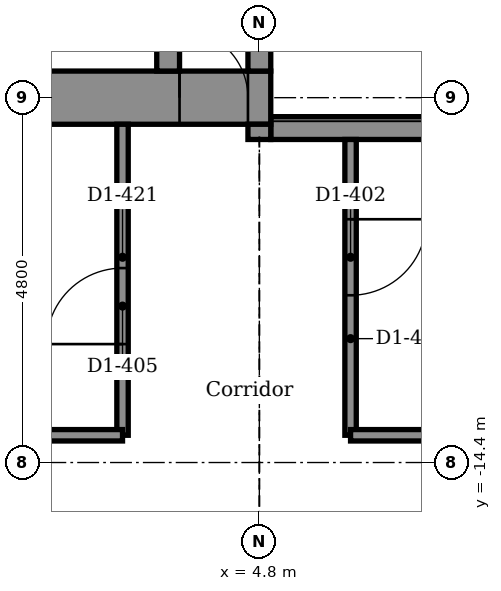
"""IFC4 building model, lengths in metres.
Left out: names, types, materials, properties, quantities, classifications, styles, units other than length and angle.
Written with IfcOpenShell. Run it as: python <this file> out.ifc"""

import sys

from ifc_helpers import new_model, si_unit, direction, frame, frame_2d, origin, place, context, subcontext, project, spatial, rectangle, extrude, element, fill, save


model = new_model("IFC4")
c1 = context("Model", 3, precision=1e-05, world=origin(), true_north=direction((0.0, 1.0)))
c2 = subcontext(c1, "Body", "Model", "MODEL_VIEW")
j1 = project(units=[si_unit("LENGTHUNIT", "METRE"), si_unit("PLANEANGLEUNIT", "RADIAN")], contexts=[c1])
p1 = place(None, origin())
s1 = spatial("IfcSite", under=j1, at=p1, CompositionType="ELEMENT")
p2 = place(p1, origin())
s2 = spatial("IfcBuilding", under=s1, at=p2, CompositionType="ELEMENT")
p3 = place(p2, frame((0.0, 0.0, 138.8)))
s3 = spatial("IfcBuildingStorey", under=s2, at=p3, CompositionType="ELEMENT", Elevation=138.8)
p4 = place(p3, frame((4.95, -10.0, -0.15), z_axis=(0.0, 0.0, 1.0), x_axis=(1.0, 0.0, 0.0)))
e1 = element("IfcWall", 1, at=p4, inside=s3, PredefinedType="STANDARD", context=c2, shape_type="SweptSolid", body=[
    extrude(rectangle(XDim=4.3, YDim=0.3, at=frame_2d((2.15, 0.0))), origin(), (0.0, 0.0, 1.0), 3.9),
])
p5 = place(p3, frame((-5.25, -9.6, -0.15), z_axis=(0.0, 0.0, 1.0), x_axis=(1.0, 0.0, 0.0)))
e2 = element("IfcWall", 2, at=p5, inside=s3, PredefinedType="SHEAR", context=c2, shape_type="SweptSolid", body=[
    extrude(rectangle(XDim=10.2, YDim=0.7, at=frame_2d((5.1, 0.0))), origin(), (0.0, 0.0, 1.0), 3.9),
])
p6 = place(p5, frame((9.0, 0.0, 0.15)))
e3 = element("IfcOpeningElement", 3, at=p6, cuts=e2, PredefinedType="OPENING", context=c2, shape_type="SweptSolid", body=[
    extrude(rectangle(XDim=0.9, YDim=2.1, at=frame_2d((0.45, 1.05))), frame((0.0, 0.36, 0.0), z_axis=(0.0, -1.0, 0.0), x_axis=(1.0, 0.0, 0.0)), (0.0, 0.0, 1.0), 0.72),
])
p7 = place(p3, frame((3.6, -9.25, -0.15), z_axis=(0.0, 0.0, 1.0), x_axis=(0.0, 1.0, 0.0)))
e4 = element("IfcWall", 4, at=p7, inside=s3, PredefinedType="STANDARD", context=c2, shape_type="SweptSolid", body=[
    extrude(rectangle(XDim=3.4, YDim=0.3, at=frame_2d((1.7, 0.0))), origin(), (0.0, 0.0, 1.0), 3.9),
])
p8 = place(p3, frame((4.8, -10.15, -0.15), z_axis=(0.0, 0.0, 1.0), x_axis=(0.0, 1.0, 0.0)))
e5 = element("IfcWall", 5, at=p8, inside=s3, PredefinedType="STANDARD", context=c2, shape_type="SweptSolid", body=[
    extrude(rectangle(XDim=0.2, YDim=0.3, at=frame_2d((0.1, 0.0))), origin(), (0.0, 0.0, 1.0), 3.9),
])
p9 = place(p3, frame((4.8, -9.25, -0.15), z_axis=(0.0, 0.0, 1.0), x_axis=(0.0, 1.0, 0.0)))
e6 = element("IfcWall", 6, at=p9, inside=s3, PredefinedType="STANDARD", context=c2, shape_type="SweptSolid", body=[
    extrude(rectangle(XDim=7.0, YDim=0.3, at=frame_2d((3.5, 0.0))), origin(), (0.0, 0.0, 1.0), 3.9),
])
p10 = place(p9, frame((3.8, 0.0, 0.15)))
e7 = element("IfcOpeningElement", 7, at=p10, cuts=e6, PredefinedType="OPENING", context=c2, shape_type="SweptSolid", body=[
    extrude(rectangle(XDim=1.2, YDim=2.1, at=frame_2d((0.6, 1.05))), frame((0.0, 0.16, 0.0), z_axis=(0.0, -1.0, 0.0), x_axis=(1.0, 0.0, 0.0)), (0.0, 0.0, 1.0), 0.32),
])
p11 = place(p3, frame((6.0, -14.042, 0.0), z_axis=(0.0, 0.0, 1.0), x_axis=(0.0, 1.0, 0.0)))
e8 = element("IfcWall", 8, at=p11, inside=s3, PredefinedType="PARTITIONING", context=c2, shape_type="SweptSolid", body=[
    extrude(rectangle(XDim=3.892, YDim=0.15, at=frame_2d((1.946, 0.0))), origin(), (0.0, 0.0, 1.0), 3.75),
])
p12 = place(p11, frame((1.842, 0.0, 0.0)))
e9 = element("IfcOpeningElement", 9, at=p12, cuts=e8, PredefinedType="OPENING", context=c2, shape_type="SweptSolid", body=[
    extrude(rectangle(XDim=1.0, YDim=2.1, at=frame_2d((0.5, 1.05))), frame((0.0, 0.085, 0.0), z_axis=(0.0, -1.0, 0.0), x_axis=(1.0, 0.0, 0.0)), (0.0, 0.0, 1.0), 0.17),
])
p13 = place(p3, frame((3.0, -14.042, 0.0), z_axis=(0.0, 0.0, 1.0), x_axis=(0.0, 1.0, 0.0)))
e10 = element("IfcWall", 10, at=p13, inside=s3, PredefinedType="PARTITIONING", context=c2, shape_type="SweptSolid", body=[
    extrude(rectangle(XDim=4.092, YDim=0.15, at=frame_2d((2.046, 0.0))), origin(), (0.0, 0.0, 1.0), 3.75),
])
p14 = place(p13, frame((1.199, 0.0, 0.0)))
e11 = element("IfcOpeningElement", 11, at=p14, cuts=e10, PredefinedType="OPENING", context=c2, shape_type="SweptSolid", body=[
    extrude(rectangle(XDim=1.0, YDim=2.1, at=frame_2d((0.5, 1.05))), frame((0.0, 0.085, 0.0), z_axis=(0.0, -1.0, 0.0), x_axis=(1.0, 0.0, 0.0)), (0.0, 0.0, 1.0), 0.17),
])
p15 = place(p3, frame((-17.021, -14.042, 0.0), z_axis=(0.0, 0.0, 1.0), x_axis=(1.0, 0.0, 0.0)))
e12 = element("IfcWall", 12, at=p15, inside=s3, PredefinedType="PARTITIONING", context=c2, shape_type="SweptSolid", body=[
    extrude(rectangle(XDim=20.021, YDim=0.15, at=frame_2d((10.011, 0.0))), origin(), (0.0, 0.0, 1.0), 3.75),
])
p16 = place(p15, frame((8.621, 0.0, 0.0)))
e13 = element("IfcOpeningElement", 13, at=p16, cuts=e12, PredefinedType="OPENING", context=c2, shape_type="SweptSolid", body=[
    extrude(rectangle(XDim=1.0, YDim=2.1, at=frame_2d((0.5, 1.05))), frame((0.0, 0.085, 0.0), z_axis=(0.0, -1.0, 0.0), x_axis=(1.0, 0.0, 0.0)), (0.0, 0.0, 1.0), 0.17),
])
p17 = place(p15, frame((13.396, 0.0, 0.0)))
e14 = element("IfcOpeningElement", 14, at=p17, cuts=e12, PredefinedType="OPENING", context=c2, shape_type="SweptSolid", body=[
    extrude(rectangle(XDim=1.0, YDim=2.1, at=frame_2d((0.5, 1.05))), frame((0.0, 0.085, 0.0), z_axis=(0.0, -1.0, 0.0), x_axis=(1.0, 0.0, 0.0)), (0.0, 0.0, 1.0), 0.17),
])
p18 = place(p3, frame((6.0, -14.042, 0.0), z_axis=(0.0, 0.0, 1.0), x_axis=(1.0, 0.0, 0.0)))
e15 = element("IfcWall", 15, at=p18, inside=s3, PredefinedType="PARTITIONING", context=c2, shape_type="SweptSolid", body=[
    extrude(rectangle(XDim=12.823, YDim=0.15, at=frame_2d((6.411, 0.0))), origin(), (0.0, 0.0, 1.0), 3.75),
])
p19 = place(p12, frame((1.0, 0.0, 0.0), z_axis=(0.0, 0.0, 1.0), x_axis=(-1.0, 0.0, 0.0)))
e16 = element("IfcDoor", 16, at=p19, inside=s3, OperationType="SINGLE_SWING_RIGHT", PredefinedType="DOOR", context=c2, shape_type="SweptSolid", body=[
    extrude(rectangle(XDim=1.0, YDim=2.1, at=frame_2d((0.5, 1.05))), frame((0.0, 0.025, 0.0), z_axis=(0.0, -1.0, 0.0), x_axis=(1.0, 0.0, 0.0)), (0.0, 0.0, 1.0), 0.05),
])
fill(e9, e16)
p20 = place(p14, origin())
e17 = element("IfcDoor", 17, at=p20, inside=s3, OperationType="SINGLE_SWING_LEFT", PredefinedType="DOOR", context=c2, shape_type="SweptSolid", body=[
    extrude(rectangle(XDim=1.0, YDim=2.1, at=frame_2d((0.5, 1.05))), frame((0.0, 0.025, 0.0), z_axis=(0.0, -1.0, 0.0), x_axis=(1.0, 0.0, 0.0)), (0.0, 0.0, 1.0), 0.05),
])
fill(e11, e17)
p21 = place(p6, origin())
e18 = element("IfcDoor", 18, at=p21, inside=s3, OperationType="SINGLE_SWING_LEFT", PredefinedType="DOOR", context=c2, shape_type="SweptSolid", body=[
    extrude(rectangle(XDim=0.9, YDim=2.1, at=frame_2d((0.45, 1.05))), frame((0.0, 0.025, 0.0), z_axis=(0.0, -1.0, 0.0), x_axis=(1.0, 0.0, 0.0)), (0.0, 0.0, 1.0), 0.05),
])
fill(e3, e18)
save(model, sys.argv[1])
